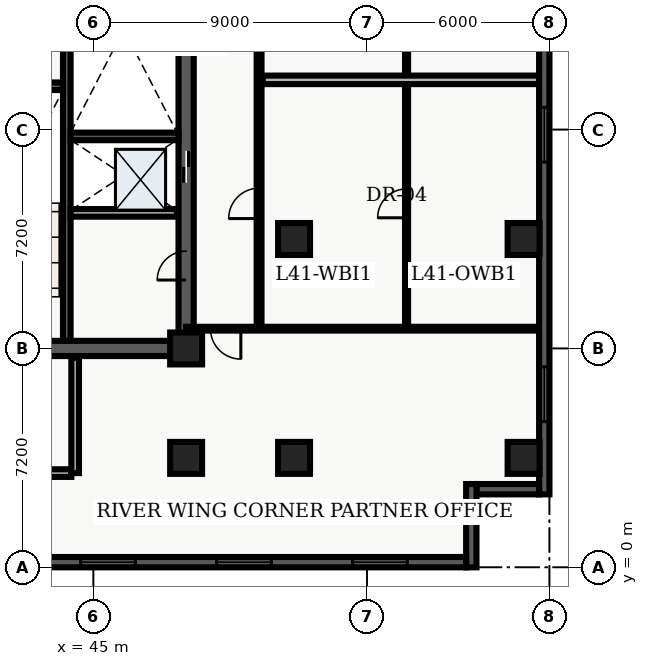
"""IFC4 building model, lengths in metres.
Left out: names, types, materials, properties, quantities, classifications, styles, units other than length and angle.
Written with IfcOpenShell. Run it as: python <this file> out.ifc"""

import sys

from ifc_helpers import new_model, entity, si_unit, converted_unit, direction, frame, origin_with_axes, origin_2d_with_axis, place, context, subcontext, project, spatial, polyline, rectangle, outline, extrude, element, fill, save


model = new_model("IFC4")
c1 = context("Model", 3, precision=1e-05, world=origin_with_axes(), true_north=direction((0.0, 1.0)))
c2 = subcontext(c1, "Body", "Model", "MODEL_VIEW")
j1 = project(units=[si_unit("LENGTHUNIT", "METRE"), converted_unit("PLANEANGLEUNIT", "DEGREE", entity("IfcPlaneAngleMeasure", 0.017), si_unit("PLANEANGLEUNIT", "RADIAN"), dimensions=[0, 0, 0, 0, 0, 0, 0])], contexts=[c1])
p1 = place(None, origin_with_axes())
s1 = spatial("IfcSite", under=j1, at=p1, CompositionType="ELEMENT")
p2 = place(p1, origin_with_axes())
s2 = spatial("IfcBuilding", under=s1, at=p2, CompositionType="ELEMENT")
p3 = place(p2, frame((0.0, 0.0, 168.0), z_axis=(0.0, 0.0, 1.0), x_axis=(1.0, 0.0, 0.0)))
s3 = spatial("IfcBuildingStorey", under=s2, at=p3, CompositionType="ELEMENT", Elevation=168.0)
p4 = place(p3, frame((40.2, 7.2, 0.0), z_axis=(0.0, 0.0, 1.0), x_axis=(1.0, 0.0, 0.0)))
e1 = element("IfcWall", 1, at=p4, inside=s3, PredefinedType="SHEAR", context=c2, shape_type="SweptSolid", body=[
    extrude(outline(polyline([(0.0, -0.25), (7.85, -0.25), (7.85, 0.25), (0.0, 0.25), (0.0, -0.25)])), origin_with_axes(), (0.0, 0.0, 1.0), 3.66),
])
p5 = place(p4, frame((2.175, 0.0, 0.0), z_axis=(0.0, 0.0, 1.0), x_axis=(1.0, 0.0, 0.0)))
e2 = element("IfcOpeningElement", 2, at=p5, cuts=e1, PredefinedType="OPENING", context=c2, shape_type="SweptSolid", body=[
    extrude(rectangle(XDim=1.05, YDim=0.52, at=origin_2d_with_axis()), origin_with_axes(), (0.0, 0.0, 1.0), 2.15),
])
p6 = place(p3, frame((48.05, 7.2, 0.0), z_axis=(0.0, 0.0, 1.0), x_axis=(0.0, 1.0, 0.0)))
e3 = element("IfcWall", 3, at=p6, inside=s3, PredefinedType="SHEAR", context=c2, shape_type="SweptSolid", body=[
    extrude(outline(polyline([(0.0, -0.25), (15.6, -0.25), (15.6, 0.25), (0.0, 0.25), (0.0, -0.25)])), origin_with_axes(), (0.0, 0.0, 1.0), 3.66),
])
p7 = place(p6, frame((5.975, 0.0, 0.0), z_axis=(0.0, 0.0, 1.0), x_axis=(1.0, 0.0, 0.0)))
e4 = element("IfcOpeningElement", 4, at=p7, cuts=e3, PredefinedType="OPENING", context=c2, shape_type="SweptSolid", body=[
    extrude(rectangle(XDim=1.05, YDim=0.52, at=origin_2d_with_axis()), origin_with_axes(), (0.0, 0.0, 1.0), 2.15),
])
p8 = place(p6, frame((2.725, 0.0, 0.0), z_axis=(0.0, 0.0, 1.0), x_axis=(1.0, 0.0, 0.0)))
e5 = element("IfcOpeningElement", 5, at=p8, cuts=e3, PredefinedType="OPENING", context=c2, shape_type="SweptSolid", body=[
    extrude(rectangle(XDim=0.95, YDim=0.52, at=origin_2d_with_axis()), origin_with_axes(), (0.0, 0.0, 1.0), 2.15),
])
p9 = place(p3, frame((44.125, 7.45, 0.0), z_axis=(0.0, 0.0, 1.0), x_axis=(0.0, 1.0, 0.0)))
e6 = element("IfcWall", 6, at=p9, inside=s3, PredefinedType="SHEAR", context=c2, shape_type="SweptSolid", body=[
    extrude(outline(polyline([(0.0, -0.125), (15.1, -0.125), (15.1, 0.125), (0.0, 0.125), (0.0, -0.125)])), origin_with_axes(), (0.0, 0.0, 1.0), 3.66),
])
for number, where, z_axis, x_axis in (
    (7, (40.45, 15.825, 0.0), (0.0, 0.0, 1.0), (1.0, 0.0, 0.0)),
    (8, (44.25, 14.175, 0.0), (0.0, 0.0, 1.0), (1.0, 0.0, 0.0)),
):
    element("IfcWall", number, at=place(p3, frame(where, z_axis=z_axis, x_axis=x_axis)), inside=s3, PredefinedType="SHEAR", context=c2, shape_type="SweptSolid", body=[
        extrude(outline(polyline([(0.0, -0.125), (3.55, -0.125), (3.55, 0.125), (0.0, 0.125), (0.0, -0.125)])), origin_with_axes(), (0.0, 0.0, 1.0), 3.66),
    ])
p10 = place(p3, frame((40.325, 3.1, 0.0), z_axis=(0.0, 0.0, 1.0), x_axis=(1.0, 0.0, 0.0)))
e9 = element("IfcWall", 9, at=p10, inside=s3, PredefinedType="SOLIDWALL", context=c2, shape_type="SweptSolid", body=[
    extrude(outline(polyline([(0.0, -0.125), (3.95, -0.125), (3.95, 0.125), (0.0, 0.125), (0.0, -0.125)])), origin_with_axes(), (0.0, 0.0, 1.0), 2.7),
])
p11 = place(p3, frame((44.4, 3.1, 0.0), z_axis=(0.0, 0.0, 1.0), x_axis=(0.0, 1.0, 0.0)))
e10 = element("IfcWall", 10, at=p11, inside=s3, PredefinedType="SOLIDWALL", context=c2, shape_type="SweptSolid", body=[
    extrude(outline(polyline([(0.0, -0.125), (3.8, -0.125), (3.8, 0.125), (0.0, 0.125), (0.0, -0.125)])), origin_with_axes(), (0.0, 0.0, 1.0), 2.7),
])
for number, where, z_axis, x_axis in (
    (11, (48.05, 3.6, 0.0), (0.0, 0.0, 1.0), (1.0, 0.0, 0.0)),
    (12, (48.05, 7.2, 0.0), (0.0, 0.0, 1.0), (1.0, 0.0, 0.0)),
    (13, (51.6, 3.6, 0.0), (0.0, 0.0, 1.0), (1.0, 0.0, 0.0)),
    (14, (51.6, 10.8, 0.0), (0.0, 0.0, 1.0), (1.0, 0.0, 0.0)),
    (15, (59.15, 3.6, 0.0), (0.0, 0.0, 1.0), (1.0, 0.0, 0.0)),
    (16, (59.15, 10.8, 0.0), (0.0, 0.0, 1.0), (1.0, 0.0, 0.0)),
):
    element("IfcColumn", number, at=place(p3, frame(where, z_axis=z_axis, x_axis=x_axis)), inside=s3, PredefinedType="COLUMN", context=c2, shape_type="SweptSolid", body=[
        extrude(rectangle(XDim=1.05, YDim=1.05, at=origin_2d_with_axis()), origin_with_axes(), (0.0, 0.0, 1.0), 3.9),
    ])
p12 = place(p3, frame((44.25, 11.66, 0.0), z_axis=(0.0, 0.0, 1.0), x_axis=(1.0, 0.0, 0.0)))
e17 = element("IfcWall", 17, at=p12, inside=s3, PredefinedType="SOLIDWALL", context=c2, shape_type="SweptSolid", body=[
    extrude(outline(polyline([(0.0, -0.125), (3.5, -0.125), (3.5, 0.125), (0.0, 0.125), (0.0, -0.125)])), origin_with_axes(), (0.0, 0.0, 1.0), 2.7),
])
p13 = place(p3, frame((50.45, 7.85, 0.0), z_axis=(0.0, 0.0, 1.0), x_axis=(0.0, 1.0, 0.0)))
e18 = element("IfcWall", 18, at=p13, inside=s3, PredefinedType="PARTITIONING", context=c2, shape_type="SweptSolid", body=[
    extrude(outline(polyline([(0.0, -0.08), (18.8, -0.08), (18.8, 0.08), (0.0, 0.08), (0.0, -0.08)])), origin_with_axes(), (0.0, 0.0, 1.0), 2.7),
])
p14 = place(p13, frame((4.122, 0.0, 0.0), z_axis=(0.0, 0.0, 1.0), x_axis=(1.0, 0.0, 0.0)))
e19 = element("IfcOpeningElement", 19, at=p14, cuts=e18, PredefinedType="OPENING", context=c2, shape_type="SweptSolid", body=[
    extrude(rectangle(XDim=1.0, YDim=0.18, at=origin_2d_with_axis()), origin_with_axes(), (0.0, 0.0, 1.0), 2.15),
])
p15 = place(p13, frame((13.463, 0.0, 0.0), z_axis=(0.0, 0.0, 1.0), x_axis=(1.0, 0.0, 0.0)))
e20 = element("IfcOpeningElement", 20, at=p15, cuts=e18, PredefinedType="OPENING", context=c2, shape_type="SweptSolid", body=[
    extrude(rectangle(XDim=1.0, YDim=0.18, at=origin_2d_with_axis()), origin_with_axes(), (0.0, 0.0, 1.0), 2.15),
])
p16 = place(p3, frame((59.665, 7.85, 0.0), z_axis=(0.0, 0.0, 1.0), x_axis=(-1.0, 0.0, 0.0)))
e21 = element("IfcWall", 21, at=p16, inside=s3, PredefinedType="PARTITIONING", context=c2, shape_type="SweptSolid", body=[
    extrude(outline(polyline([(0.0, -0.062), (11.615, -0.062), (11.615, 0.062), (0.0, 0.062), (0.0, -0.062)])), origin_with_axes(), (0.0, 0.0, 1.0), 2.7),
])
p17 = place(p16, frame((10.315, 0.0, 0.0), z_axis=(0.0, 0.0, 1.0), x_axis=(1.0, 0.0, 0.0)))
e22 = element("IfcOpeningElement", 22, at=p17, cuts=e21, PredefinedType="OPENING", context=c2, shape_type="SweptSolid", body=[
    extrude(rectangle(XDim=1.0, YDim=0.145, at=origin_2d_with_axis()), origin_with_axes(), (0.0, 0.0, 1.0), 2.15),
])
p18 = place(p3, frame((55.3, 7.98, 0.0), z_axis=(0.0, 0.0, 1.0), x_axis=(0.0, 1.0, 0.0)))
e23 = element("IfcWall", 23, at=p18, inside=s3, PredefinedType="PARTITIONING", context=c2, shape_type="SweptSolid", body=[
    extrude(outline(polyline([(0.0, -0.05), (18.54, -0.05), (18.54, 0.05), (0.0, 0.05), (0.0, -0.05)])), origin_with_axes(), (0.0, 0.0, 1.0), 2.7),
])
p19 = place(p18, frame((3.993, 0.0, 0.0), z_axis=(0.0, 0.0, 1.0), x_axis=(1.0, 0.0, 0.0)))
e24 = element("IfcOpeningElement", 24, at=p19, cuts=e23, PredefinedType="OPENING", context=c2, shape_type="SweptSolid", body=[
    extrude(rectangle(XDim=0.95, YDim=0.12, at=origin_2d_with_axis()), origin_with_axes(), (0.0, 0.0, 1.0), 2.15),
])
p20 = place(p18, frame((13.332, 0.0, 0.0), z_axis=(0.0, 0.0, 1.0), x_axis=(1.0, 0.0, 0.0)))
e25 = element("IfcOpeningElement", 25, at=p20, cuts=e23, PredefinedType="OPENING", context=c2, shape_type="SweptSolid", body=[
    extrude(rectangle(XDim=0.95, YDim=0.12, at=origin_2d_with_axis()), origin_with_axes(), (0.0, 0.0, 1.0), 2.15),
])
p21 = place(p3, frame((50.57, 16.035, 0.0), z_axis=(0.0, 0.0, 1.0), x_axis=(1.0, 0.0, 0.0)))
e26 = element("IfcWall", 26, at=p21, inside=s3, PredefinedType="PARTITIONING", context=c2, shape_type="SweptSolid", body=[
    extrude(outline(polyline([(0.0, -0.14), (9.095, -0.14), (9.095, 0.14), (0.0, 0.14), (0.0, -0.14)])), origin_with_axes(), (0.0, 0.0, 1.0), 2.7),
])
p22 = place(p3, frame((59.83, 26.06, 0.0), z_axis=(0.0, 0.0, 1.0), x_axis=(0.0, -1.0, 0.0)))
e27 = element("IfcWall", 27, at=p22, inside=s3, PredefinedType="SOLIDWALL", context=c2, shape_type="SweptSolid", body=[
    extrude(outline(polyline([(0.0, -0.17), (23.66, -0.17), (23.66, 0.17), (0.0, 0.17), (0.0, -0.17)])), origin_with_axes(), (0.0, 0.0, 1.0), 3.66),
])
p23 = place(p22, frame((3.696, 0.0, 0.45), z_axis=(0.0, 0.0, 1.0), x_axis=(1.0, 0.0, 0.0)))
e28 = element("IfcOpeningElement", 28, at=p23, cuts=e27, PredefinedType="OPENING", context=c2, shape_type="SweptSolid", body=[
    extrude(rectangle(XDim=1.8, YDim=0.36, at=origin_2d_with_axis()), origin_with_axes(), (0.0, 0.0, 1.0), 2.1),
])
p24 = place(p22, frame((11.83, 0.0, 0.45), z_axis=(0.0, 0.0, 1.0), x_axis=(1.0, 0.0, 0.0)))
e29 = element("IfcOpeningElement", 29, at=p24, cuts=e27, PredefinedType="OPENING", context=c2, shape_type="SweptSolid", body=[
    extrude(rectangle(XDim=1.8, YDim=0.36, at=origin_2d_with_axis()), origin_with_axes(), (0.0, 0.0, 1.0), 2.1),
])
p25 = place(p22, frame((20.364, 0.0, 0.45), z_axis=(0.0, 0.0, 1.0), x_axis=(1.0, 0.0, 0.0)))
e30 = element("IfcOpeningElement", 30, at=p25, cuts=e27, PredefinedType="OPENING", context=c2, shape_type="SweptSolid", body=[
    extrude(rectangle(XDim=1.8, YDim=0.36, at=origin_2d_with_axis()), origin_with_axes(), (0.0, 0.0, 1.0), 2.1),
])
p26 = place(p3, frame((59.66, 2.57, 0.0), z_axis=(0.0, 0.0, 1.0), x_axis=(-1.0, 0.0, 0.0)))
e31 = element("IfcWall", 31, at=p26, inside=s3, PredefinedType="SOLIDWALL", context=c2, shape_type="SweptSolid", body=[
    extrude(outline(polyline([(0.0, -0.17), (2.06, -0.17), (2.06, 0.17), (0.0, 0.17), (0.0, -0.17)])), origin_with_axes(), (0.0, 0.0, 1.0), 3.66),
])
p27 = place(p3, frame((57.43, 2.74, 0.0), z_axis=(0.0, 0.0, 1.0), x_axis=(0.0, -1.0, 0.0)))
e32 = element("IfcWall", 32, at=p27, inside=s3, PredefinedType="SOLIDWALL", context=c2, shape_type="SweptSolid", body=[
    extrude(outline(polyline([(0.0, -0.17), (2.74, -0.17), (2.74, 0.17), (0.0, 0.17), (0.0, -0.17)])), origin_with_axes(), (0.0, 0.0, 1.0), 3.66),
])
p28 = place(p3, frame((57.26, 0.17, 0.0), z_axis=(0.0, 0.0, 1.0), x_axis=(-1.0, 0.0, 0.0)))
e33 = element("IfcWall", 33, at=p28, inside=s3, PredefinedType="SOLIDWALL", context=c2, shape_type="SweptSolid", body=[
    extrude(outline(polyline([(0.0, -0.17), (54.86, -0.17), (54.86, 0.17), (0.0, 0.17), (0.0, -0.17)])), origin_with_axes(), (0.0, 0.0, 1.0), 3.66),
])
p29 = place(p28, frame((2.836, 0.0, 0.45), z_axis=(0.0, 0.0, 1.0), x_axis=(1.0, 0.0, 0.0)))
e34 = element("IfcOpeningElement", 34, at=p29, cuts=e33, PredefinedType="OPENING", context=c2, shape_type="SweptSolid", body=[
    extrude(rectangle(XDim=1.8, YDim=0.36, at=origin_2d_with_axis()), origin_with_axes(), (0.0, 0.0, 1.0), 2.1),
])
p30 = place(p28, frame((7.307, 0.0, 0.45), z_axis=(0.0, 0.0, 1.0), x_axis=(1.0, 0.0, 0.0)))
e35 = element("IfcOpeningElement", 35, at=p30, cuts=e33, PredefinedType="OPENING", context=c2, shape_type="SweptSolid", body=[
    extrude(rectangle(XDim=1.8, YDim=0.36, at=origin_2d_with_axis()), origin_with_axes(), (0.0, 0.0, 1.0), 2.1),
])
p31 = place(p28, frame((11.779, 0.0, 0.45), z_axis=(0.0, 0.0, 1.0), x_axis=(1.0, 0.0, 0.0)))
e36 = element("IfcOpeningElement", 36, at=p31, cuts=e33, PredefinedType="OPENING", context=c2, shape_type="SweptSolid", body=[
    extrude(rectangle(XDim=1.8, YDim=0.36, at=origin_2d_with_axis()), origin_with_axes(), (0.0, 0.0, 1.0), 2.1),
])
p32 = place(p28, frame((16.251, 0.0, 0.45), z_axis=(0.0, 0.0, 1.0), x_axis=(1.0, 0.0, 0.0)))
e37 = element("IfcOpeningElement", 37, at=p32, cuts=e33, PredefinedType="OPENING", context=c2, shape_type="SweptSolid", body=[
    extrude(rectangle(XDim=1.8, YDim=0.36, at=origin_2d_with_axis()), origin_with_axes(), (0.0, 0.0, 1.0), 2.1),
])
p33 = place(p28, frame((20.723, 0.0, 0.45), z_axis=(0.0, 0.0, 1.0), x_axis=(1.0, 0.0, 0.0)))
e38 = element("IfcOpeningElement", 38, at=p33, cuts=e33, PredefinedType="OPENING", context=c2, shape_type="SweptSolid", body=[
    extrude(rectangle(XDim=1.8, YDim=0.36, at=origin_2d_with_axis()), origin_with_axes(), (0.0, 0.0, 1.0), 2.1),
])
p34 = place(p28, frame((25.194, 0.0, 0.45), z_axis=(0.0, 0.0, 1.0), x_axis=(1.0, 0.0, 0.0)))
e39 = element("IfcOpeningElement", 39, at=p34, cuts=e33, PredefinedType="OPENING", context=c2, shape_type="SweptSolid", body=[
    extrude(rectangle(XDim=1.8, YDim=0.36, at=origin_2d_with_axis()), origin_with_axes(), (0.0, 0.0, 1.0), 2.1),
])
p35 = place(p28, frame((34.138, 0.0, 0.45), z_axis=(0.0, 0.0, 1.0), x_axis=(1.0, 0.0, 0.0)))
e40 = element("IfcOpeningElement", 40, at=p35, cuts=e33, PredefinedType="OPENING", context=c2, shape_type="SweptSolid", body=[
    extrude(rectangle(XDim=1.8, YDim=0.36, at=origin_2d_with_axis()), origin_with_axes(), (0.0, 0.0, 1.0), 2.1),
])
p36 = place(p28, frame((38.609, 0.0, 0.45), z_axis=(0.0, 0.0, 1.0), x_axis=(1.0, 0.0, 0.0)))
e41 = element("IfcOpeningElement", 41, at=p36, cuts=e33, PredefinedType="OPENING", context=c2, shape_type="SweptSolid", body=[
    extrude(rectangle(XDim=1.8, YDim=0.36, at=origin_2d_with_axis()), origin_with_axes(), (0.0, 0.0, 1.0), 2.1),
])
p37 = place(p28, frame((42.231, 0.0, 0.45), z_axis=(0.0, 0.0, 1.0), x_axis=(1.0, 0.0, 0.0)))
e42 = element("IfcOpeningElement", 42, at=p37, cuts=e33, PredefinedType="OPENING", context=c2, shape_type="SweptSolid", body=[
    extrude(rectangle(XDim=1.8, YDim=0.36, at=origin_2d_with_axis()), origin_with_axes(), (0.0, 0.0, 1.0), 2.1),
])
p38 = place(p28, frame((47.553, 0.0, 0.45), z_axis=(0.0, 0.0, 1.0), x_axis=(1.0, 0.0, 0.0)))
e43 = element("IfcOpeningElement", 43, at=p38, cuts=e33, PredefinedType="OPENING", context=c2, shape_type="SweptSolid", body=[
    extrude(rectangle(XDim=1.8, YDim=0.36, at=origin_2d_with_axis()), origin_with_axes(), (0.0, 0.0, 1.0), 2.1),
])
p39 = place(p28, frame((52.024, 0.0, 0.45), z_axis=(0.0, 0.0, 1.0), x_axis=(1.0, 0.0, 0.0)))
e44 = element("IfcOpeningElement", 44, at=p39, cuts=e33, PredefinedType="OPENING", context=c2, shape_type="SweptSolid", body=[
    extrude(rectangle(XDim=1.8, YDim=0.36, at=origin_2d_with_axis()), origin_with_axes(), (0.0, 0.0, 1.0), 2.1),
])
p40 = place(p6, frame((5.975, 0.0, 0.0), z_axis=(0.0, 0.0, 1.0), x_axis=(1.0, 0.0, 0.0)))
e45 = element("IfcDoor", 45, at=p40, inside=s3, OperationType="SLIDING_TO_LEFT", PredefinedType="DOOR", context=c2, shape_type="SweptSolid", body=[
    extrude(rectangle(XDim=1.05, YDim=0.09, at=origin_2d_with_axis()), origin_with_axes(), (0.0, 0.0, 1.0), 2.15),
])
fill(e4, e45)
p41 = place(p6, frame((2.725, 0.0, 0.0), z_axis=(0.0, 0.0, 1.0), x_axis=(1.0, 0.0, 0.0)))
e46 = element("IfcDoor", 46, at=p41, inside=s3, OperationType="SINGLE_SWING_LEFT", PredefinedType="DOOR", context=c2, shape_type="SweptSolid", body=[
    extrude(rectangle(XDim=0.95, YDim=0.09, at=origin_2d_with_axis()), origin_with_axes(), (0.0, 0.0, 1.0), 2.15),
])
fill(e5, e46)
p42 = place(p16, frame((10.315, 0.0, 0.0), z_axis=(0.0, 0.0, 1.0), x_axis=(1.0, 0.0, 0.0)))
e47 = element("IfcDoor", 47, at=p42, inside=s3, OperationType="SINGLE_SWING_LEFT", PredefinedType="DOOR", context=c2, shape_type="SweptSolid", body=[
    extrude(rectangle(XDim=1.0, YDim=0.075, at=origin_2d_with_axis()), origin_with_axes(), (0.0, 0.0, 1.0), 2.15),
])
fill(e22, e47)
p43 = place(p18, frame((3.993, 0.0, 0.0), z_axis=(0.0, 0.0, 1.0), x_axis=(1.0, 0.0, 0.0)))
e48 = element("IfcDoor", 48, at=p43, inside=s3, OperationType="SINGLE_SWING_LEFT", PredefinedType="DOOR", context=c2, shape_type="SweptSolid", body=[
    extrude(rectangle(XDim=0.95, YDim=0.06, at=origin_2d_with_axis()), origin_with_axes(), (0.0, 0.0, 1.0), 2.15),
])
fill(e24, e48)
p44 = place(p13, frame((4.122, 0.0, 0.0), z_axis=(0.0, 0.0, 1.0), x_axis=(1.0, 0.0, 0.0)))
e49 = element("IfcDoor", 49, at=p44, inside=s3, OperationType="SINGLE_SWING_LEFT", PredefinedType="DOOR", context=c2, shape_type="SweptSolid", body=[
    extrude(rectangle(XDim=1.0, YDim=0.09, at=origin_2d_with_axis()), origin_with_axes(), (0.0, 0.0, 1.0), 2.15),
])
fill(e19, e49)
p45 = place(p22, frame((11.83, 0.0, 0.45), z_axis=(0.0, 0.0, 1.0), x_axis=(1.0, 0.0, 0.0)))
e50 = element("IfcWindow", 50, at=p45, inside=s3, PredefinedType="WINDOW", context=c2, shape_type="SweptSolid", body=[
    extrude(rectangle(XDim=1.8, YDim=0.09, at=origin_2d_with_axis()), origin_with_axes(), (0.0, 0.0, 1.0), 2.1),
])
fill(e29, e50)
p46 = place(p22, frame((20.364, 0.0, 0.45), z_axis=(0.0, 0.0, 1.0), x_axis=(1.0, 0.0, 0.0)))
e51 = element("IfcWindow", 51, at=p46, inside=s3, PredefinedType="WINDOW", context=c2, shape_type="SweptSolid", body=[
    extrude(rectangle(XDim=1.8, YDim=0.09, at=origin_2d_with_axis()), origin_with_axes(), (0.0, 0.0, 1.0), 2.1),
])
fill(e30, e51)
p47 = place(p28, frame((2.836, 0.0, 0.45), z_axis=(0.0, 0.0, 1.0), x_axis=(1.0, 0.0, 0.0)))
e52 = element("IfcWindow", 52, at=p47, inside=s3, PredefinedType="WINDOW", context=c2, shape_type="SweptSolid", body=[
    extrude(rectangle(XDim=1.8, YDim=0.09, at=origin_2d_with_axis()), origin_with_axes(), (0.0, 0.0, 1.0), 2.1),
])
fill(e34, e52)
p48 = place(p28, frame((7.307, 0.0, 0.45), z_axis=(0.0, 0.0, 1.0), x_axis=(1.0, 0.0, 0.0)))
e53 = element("IfcWindow", 53, at=p48, inside=s3, PredefinedType="WINDOW", context=c2, shape_type="SweptSolid", body=[
    extrude(rectangle(XDim=1.8, YDim=0.09, at=origin_2d_with_axis()), origin_with_axes(), (0.0, 0.0, 1.0), 2.1),
])
fill(e35, e53)
p49 = place(p28, frame((11.779, 0.0, 0.45), z_axis=(0.0, 0.0, 1.0), x_axis=(1.0, 0.0, 0.0)))
e54 = element("IfcWindow", 54, at=p49, inside=s3, PredefinedType="WINDOW", context=c2, shape_type="SweptSolid", body=[
    extrude(rectangle(XDim=1.8, YDim=0.09, at=origin_2d_with_axis()), origin_with_axes(), (0.0, 0.0, 1.0), 2.1),
])
fill(e36, e54)
save(model, sys.argv[1])
